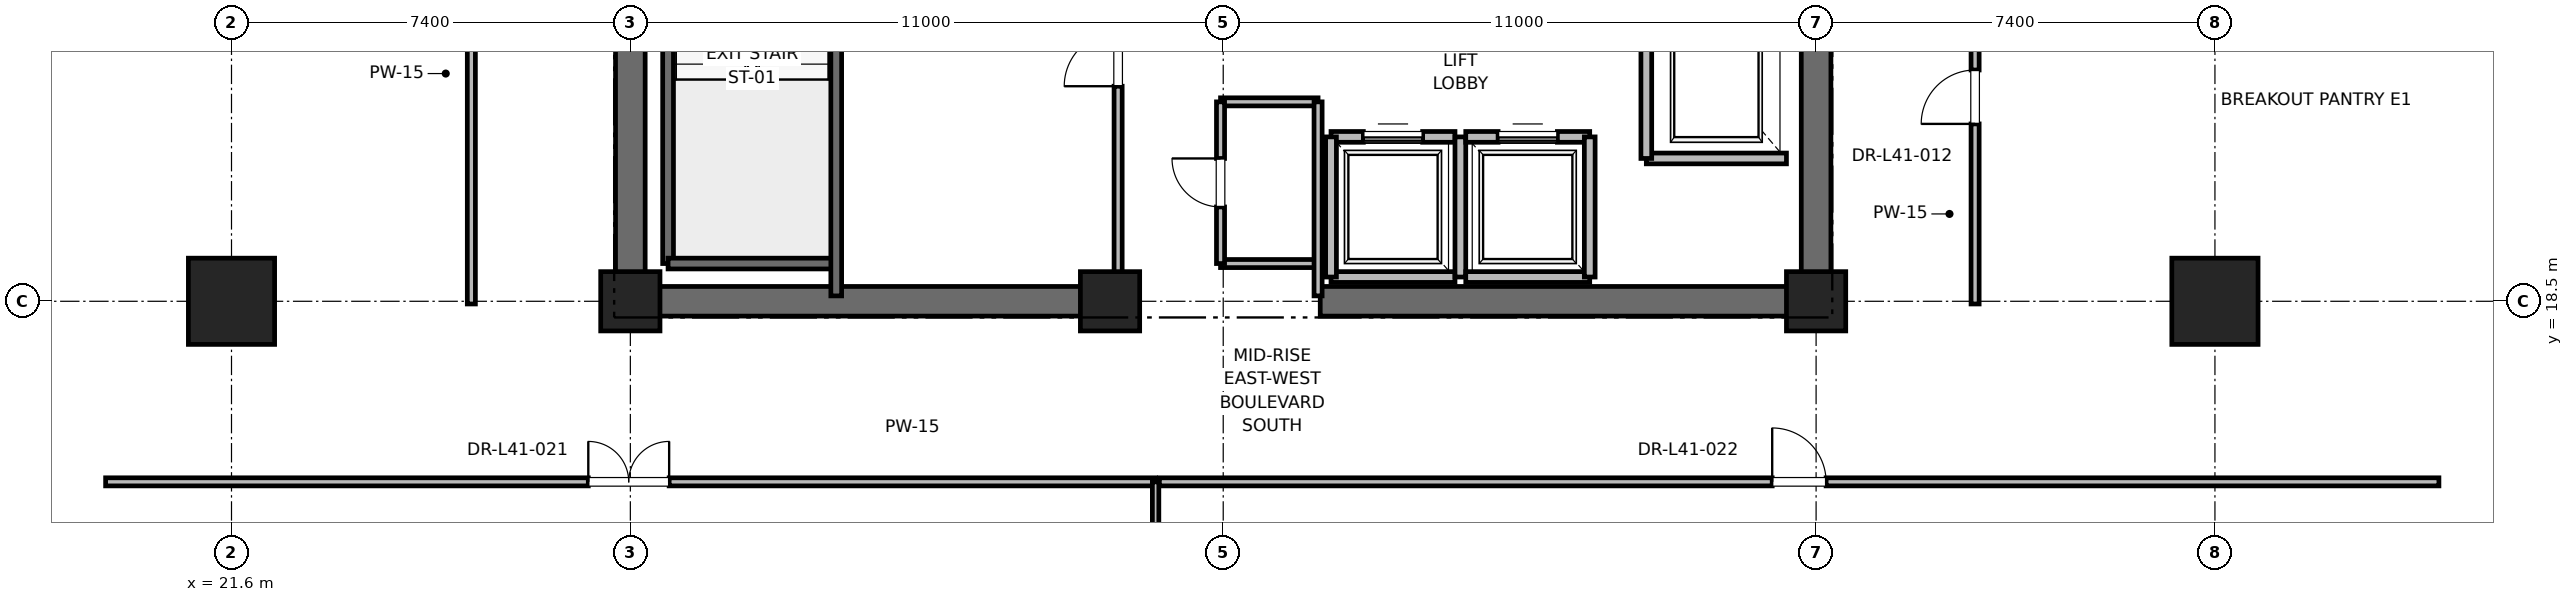
"""IFC4 building model, lengths in metres.
Left out: names, types, materials, properties, quantities, classifications, styles, units other than length and angle.
Written with IfcOpenShell. Run it as: python <this file> out.ifc"""

import sys

from ifc_helpers import new_model, si_unit, direction, frame, frame_2d, origin, origin_2d, place, context, subcontext, project, spatial, rectangle, extrude, element, fill, save


model = new_model("IFC4")
c1 = context("Model", 3, precision=1e-05, world=origin(), true_north=direction((0.0, 1.0)))
c2 = subcontext(c1, "Body", "Model", "MODEL_VIEW")
j1 = project(units=[si_unit("LENGTHUNIT", "METRE"), si_unit("PLANEANGLEUNIT", "RADIAN")], contexts=[c1])
p1 = place(None, origin())
s1 = spatial("IfcSite", under=j1, at=p1, CompositionType="ELEMENT")
p2 = place(p1, origin())
s2 = spatial("IfcBuilding", under=s1, at=p2, CompositionType="ELEMENT")
p3 = place(p2, frame((0.0, 0.0, 176.4)))
s3 = spatial("IfcBuildingStorey", under=s2, at=p3, CompositionType="ELEMENT", Elevation=176.4)
for number, where, z_axis, x_axis in (
    (1, (21.6, 18.5, 0.0), (0.0, 0.0, 1.0), (1.0, 0.0, 0.0)),
    (2, (58.4, 18.5, 0.0), (0.0, 0.0, 1.0), (1.0, 0.0, 0.0)),
):
    element("IfcColumn", number, at=place(p3, frame(where, z_axis=z_axis, x_axis=x_axis)), inside=s3, PredefinedType="COLUMN", context=c2, shape_type="SweptSolid", body=[
        extrude(rectangle(XDim=1.6, YDim=1.6, at=origin_2d()), origin(), (0.0, 0.0, 1.0), 4.0),
    ])
for number, where, z_axis, x_axis in (
    (3, (29.0, 18.5, 0.0), (0.0, 0.0, 1.0), (1.0, 0.0, 0.0)),
    (4, (51.0, 18.5, 0.0), (0.0, 0.0, 1.0), (1.0, 0.0, 0.0)),
    (5, (37.9, 18.5, 0.0), (0.0, 0.0, 1.0), (1.0, 0.0, 0.0)),
):
    element("IfcColumn", number, at=place(p3, frame(where, z_axis=z_axis, x_axis=x_axis)), inside=s3, PredefinedType="PILASTER", context=c2, shape_type="SweptSolid", body=[
        extrude(rectangle(XDim=1.1, YDim=1.1, at=origin_2d()), origin(), (0.0, 0.0, 1.0), 4.0),
    ])
for number, where, z_axis, x_axis in (
    (6, (29.0, 18.5, 0.0), (0.0, 0.0, 1.0), (1.0, 0.0, 0.0)),
    (7, (41.8, 18.5, 0.0), (0.0, 0.0, 1.0), (1.0, 0.0, 0.0)),
):
    element("IfcWall", number, at=place(p3, frame(where, z_axis=z_axis, x_axis=x_axis)), inside=s3, PredefinedType="SHEAR", context=c2, shape_type="SweptSolid", body=[
        extrude(rectangle(XDim=9.2, YDim=0.55, at=frame_2d((4.6, 0.0))), origin(), (0.0, 0.0, 1.0), 3.775),
    ])
p4 = place(p3, frame((29.0, 18.5, 0.0), z_axis=(0.0, 0.0, 1.0), x_axis=(0.0, 1.0, 0.0)))
e8 = element("IfcWall", 8, at=p4, inside=s3, PredefinedType="SHEAR", context=c2, shape_type="SweptSolid", body=[
    extrude(rectangle(XDim=8.8, YDim=0.55, at=frame_2d((4.4, 0.0))), origin(), (0.0, 0.0, 1.0), 3.775),
])
p5 = place(p3, frame((51.0, 18.5, 0.0), z_axis=(0.0, 0.0, 1.0), x_axis=(0.0, 1.0, 0.0)))
e9 = element("IfcWall", 9, at=p5, inside=s3, PredefinedType="SHEAR", context=c2, shape_type="SweptSolid", body=[
    extrude(rectangle(XDim=5.8, YDim=0.55, at=frame_2d((2.9, 0.0))), origin(), (0.0, 0.0, 1.0), 3.775),
])
p6 = place(p3, frame((29.7, 19.2, 0.0), z_axis=(0.0, 0.0, 1.0), x_axis=(0.0, 1.0, 0.0)))
e10 = element("IfcWall", 10, at=p6, inside=s3, PredefinedType="SOLIDWALL", context=c2, shape_type="SweptSolid", body=[
    extrude(rectangle(XDim=8.15, YDim=0.2, at=frame_2d((4.075, 0.0))), origin(), (0.0, 0.0, 1.0), 3.775),
])
p7 = place(p3, frame((29.7, 19.2, 0.0), z_axis=(0.0, 0.0, 1.0), x_axis=(1.0, 0.0, 0.0)))
e11 = element("IfcWall", 11, at=p7, inside=s3, PredefinedType="SOLIDWALL", context=c2, shape_type="SweptSolid", body=[
    extrude(rectangle(XDim=3.12, YDim=0.2, at=frame_2d((1.56, 0.0))), origin(), (0.0, 0.0, 1.0), 3.775),
])
p8 = place(p3, frame((32.82, 18.6, 0.0), z_axis=(0.0, 0.0, 1.0), x_axis=(0.0, 1.0, 0.0)))
e12 = element("IfcWall", 12, at=p8, inside=s3, PredefinedType="SOLIDWALL", context=c2, shape_type="SweptSolid", body=[
    extrude(rectangle(XDim=8.78, YDim=0.2, at=frame_2d((4.39, 0.0))), origin(), (0.0, 0.0, 1.0), 3.775),
])
p9 = place(p3, frame((47.85, 21.15, 0.0), z_axis=(0.0, 0.0, 1.0), x_axis=(1.0, 0.0, 0.0)))
e13 = element("IfcWall", 13, at=p9, inside=s3, PredefinedType="SOLIDWALL", context=c2, shape_type="SweptSolid", body=[
    extrude(rectangle(XDim=2.6, YDim=0.2, at=frame_2d((1.3, 0.0))), origin(), (0.0, 0.0, 1.0), 3.775),
])
p10 = place(p3, frame((47.85, 24.15, 0.0), z_axis=(0.0, 0.0, 1.0), x_axis=(0.0, -1.0, 0.0)))
e14 = element("IfcWall", 14, at=p10, inside=s3, PredefinedType="SOLIDWALL", context=c2, shape_type="SweptSolid", body=[
    extrude(rectangle(XDim=3.0, YDim=0.2, at=frame_2d((1.5, 0.0))), origin(), (0.0, 0.0, 1.0), 3.775),
])
p11 = place(p3, frame((42.0, 18.95, 0.0), z_axis=(0.0, 0.0, 1.0), x_axis=(1.0, 0.0, 0.0)))
e15 = element("IfcWall", 15, at=p11, inside=s3, PredefinedType="SOLIDWALL", context=c2, shape_type="SweptSolid", body=[
    extrude(rectangle(XDim=2.3, YDim=0.2, at=frame_2d((1.15, 0.0))), origin(), (0.0, 0.0, 1.0), 2.755),
])
p12 = place(p3, frame((44.3, 21.55, 0.0), z_axis=(0.0, 0.0, 1.0), x_axis=(-1.0, 0.0, 0.0)))
e16 = element("IfcWall", 16, at=p12, inside=s3, PredefinedType="SOLIDWALL", context=c2, shape_type="SweptSolid", body=[
    extrude(rectangle(XDim=2.3, YDim=0.2, at=frame_2d((1.15, 0.0))), origin(), (0.0, 0.0, 1.0), 3.775),
])
p13 = place(p12, frame((0.6, 0.0, 0.0)))
e17 = element("IfcOpeningElement", 17, at=p13, cuts=e16, PredefinedType="OPENING", context=c2, shape_type="SweptSolid", body=[
    extrude(rectangle(XDim=1.1, YDim=2.2, at=frame_2d((0.55, 1.1))), frame((0.0, 0.1, 0.0), z_axis=(0.0, -1.0, 0.0), x_axis=(1.0, 0.0, 0.0)), (0.0, 0.0, 1.0), 0.2),
])
p14 = place(p3, frame((42.0, 21.55, 0.0), z_axis=(0.0, 0.0, 1.0), x_axis=(0.0, -1.0, 0.0)))
e18 = element("IfcWall", 18, at=p14, inside=s3, PredefinedType="SOLIDWALL", context=c2, shape_type="SweptSolid", body=[
    extrude(rectangle(XDim=2.6, YDim=0.2, at=frame_2d((1.3, 0.0))), origin(), (0.0, 0.0, 1.0), 2.755),
])
p15 = place(p3, frame((44.4, 18.95, 0.0), z_axis=(0.0, 0.0, 1.0), x_axis=(0.0, 1.0, 0.0)))
e19 = element("IfcWall", 19, at=p15, inside=s3, PredefinedType="SOLIDWALL", context=c2, shape_type="SweptSolid", body=[
    extrude(rectangle(XDim=2.6, YDim=0.2, at=frame_2d((1.3, 0.0))), origin(), (0.0, 0.0, 1.0), 3.775),
])
p16 = place(p3, frame((44.5, 18.95, 0.0), z_axis=(0.0, 0.0, 1.0), x_axis=(1.0, 0.0, 0.0)))
e20 = element("IfcWall", 20, at=p16, inside=s3, PredefinedType="SOLIDWALL", context=c2, shape_type="SweptSolid", body=[
    extrude(rectangle(XDim=2.3, YDim=0.2, at=frame_2d((1.15, 0.0))), origin(), (0.0, 0.0, 1.0), 3.775),
])
p17 = place(p3, frame((46.8, 21.55, 0.0), z_axis=(0.0, 0.0, 1.0), x_axis=(-1.0, 0.0, 0.0)))
e21 = element("IfcWall", 21, at=p17, inside=s3, PredefinedType="SOLIDWALL", context=c2, shape_type="SweptSolid", body=[
    extrude(rectangle(XDim=2.3, YDim=0.2, at=frame_2d((1.15, 0.0))), origin(), (0.0, 0.0, 1.0), 3.775),
])
p18 = place(p17, frame((0.6, 0.0, 0.0)))
e22 = element("IfcOpeningElement", 22, at=p18, cuts=e21, PredefinedType="OPENING", context=c2, shape_type="SweptSolid", body=[
    extrude(rectangle(XDim=1.1, YDim=2.2, at=frame_2d((0.55, 1.1))), frame((0.0, 0.1, 0.0), z_axis=(0.0, -1.0, 0.0), x_axis=(1.0, 0.0, 0.0)), (0.0, 0.0, 1.0), 0.2),
])
p19 = place(p3, frame((46.8, 18.95, 0.0), z_axis=(0.0, 0.0, 1.0), x_axis=(0.0, 1.0, 0.0)))
e23 = element("IfcWall", 23, at=p19, inside=s3, PredefinedType="SOLIDWALL", context=c2, shape_type="SweptSolid", body=[
    extrude(rectangle(XDim=2.6, YDim=0.2, at=frame_2d((1.3, 0.0))), origin(), (0.0, 0.0, 1.0), 3.775),
])
for number, where, z_axis, x_axis in (
    (24, (39.95, 19.2, 0.0), (0.0, 0.0, 1.0), (1.0, 0.0, 0.0)),
    (25, (39.95, 22.2, 0.0), (0.0, 0.0, 1.0), (1.0, 0.0, 0.0)),
):
    element("IfcWall", number, at=place(p3, frame(where, z_axis=z_axis, x_axis=x_axis)), inside=s3, PredefinedType="PARTITIONING", context=c2, shape_type="SweptSolid", body=[
        extrude(rectangle(XDim=1.81, YDim=0.15, at=frame_2d((0.905, 0.0))), origin(), (0.0, 0.0, 1.0), 2.85),
    ])
p20 = place(p3, frame((41.76, 18.6, 0.0), z_axis=(0.0, 0.0, 1.0), x_axis=(0.0, 1.0, 0.0)))
e26 = element("IfcWall", 26, at=p20, inside=s3, PredefinedType="PARTITIONING", context=c2, shape_type="SweptSolid", body=[
    extrude(rectangle(XDim=3.6, YDim=0.15, at=frame_2d((1.8, 0.0))), origin(), (0.0, 0.0, 1.0), 2.755),
])
p21 = place(p3, frame((39.95, 19.2, 0.0), z_axis=(0.0, 0.0, 1.0), x_axis=(0.0, 1.0, 0.0)))
e27 = element("IfcWall", 27, at=p21, inside=s3, PredefinedType="PARTITIONING", context=c2, shape_type="SweptSolid", body=[
    extrude(rectangle(XDim=3.0, YDim=0.15, at=frame_2d((1.5, 0.0))), origin(), (0.0, 0.0, 1.0), 2.85),
])
p22 = place(p21, frame((1.05, 0.0, 0.0)))
e28 = element("IfcOpeningElement", 28, at=p22, cuts=e27, PredefinedType="OPENING", context=c2, shape_type="SweptSolid", body=[
    extrude(rectangle(XDim=0.9, YDim=2.1, at=frame_2d((0.45, 1.05))), frame((0.0, 0.075, 0.0), z_axis=(0.0, -1.0, 0.0), x_axis=(1.0, 0.0, 0.0)), (0.0, 0.0, 1.0), 0.15),
])
p23 = place(p3, frame((38.05, 18.6, 0.0), z_axis=(0.0, 0.0, 1.0), x_axis=(0.0, 1.0, 0.0)))
e29 = element("IfcWall", 29, at=p23, inside=s3, PredefinedType="PARTITIONING", context=c2, shape_type="SweptSolid", body=[
    extrude(rectangle(XDim=8.78, YDim=0.15, at=frame_2d((4.39, 0.0))), origin(), (0.0, 0.0, 1.0), 2.755),
])
p24 = place(p23, frame((3.89, 0.0, 0.0)))
e30 = element("IfcOpeningElement", 30, at=p24, cuts=e29, PredefinedType="OPENING", context=c2, shape_type="SweptSolid", body=[
    extrude(rectangle(XDim=1.0, YDim=2.15, at=frame_2d((0.5, 1.075))), frame((0.0, 0.075, 0.0), z_axis=(0.0, -1.0, 0.0), x_axis=(1.0, 0.0, 0.0)), (0.0, 0.0, 1.0), 0.15),
])
p25 = place(p3, frame((19.264, 15.15, 0.0), z_axis=(0.0, 0.0, 1.0), x_axis=(1.0, 0.0, 0.0)))
e31 = element("IfcWall", 31, at=p25, inside=s3, PredefinedType="PARTITIONING", context=c2, shape_type="SweptSolid", body=[
    extrude(rectangle(XDim=19.481, YDim=0.15, at=frame_2d((9.74, 0.0))), origin(), (0.0, 0.0, 1.0), 2.85),
])
p26 = place(p25, frame((8.956, 0.0, 0.0)))
e32 = element("IfcOpeningElement", 32, at=p26, cuts=e31, PredefinedType="OPENING", context=c2, shape_type="SweptSolid", body=[
    extrude(rectangle(XDim=1.5, YDim=2.25, at=frame_2d((0.75, 1.125))), frame((0.0, 0.075, 0.0), z_axis=(0.0, -1.0, 0.0), x_axis=(1.0, 0.0, 0.0)), (0.0, 0.0, 1.0), 0.15),
])
p27 = place(p3, frame((38.745, 5.905, 0.0), z_axis=(0.0, 0.0, 1.0), x_axis=(0.0, 1.0, 0.0)))
e33 = element("IfcWall", 33, at=p27, inside=s3, PredefinedType="PARTITIONING", context=c2, shape_type="SweptSolid", body=[
    extrude(rectangle(XDim=9.245, YDim=0.12, at=frame_2d((4.623, 0.0))), origin(), (0.0, 0.0, 1.0), 2.405),
])
p28 = place(p3, frame((38.815, 15.15, 0.0), z_axis=(0.0, 0.0, 1.0), x_axis=(1.0, 0.0, 0.0)))
e34 = element("IfcWall", 34, at=p28, inside=s3, PredefinedType="PARTITIONING", context=c2, shape_type="SweptSolid", body=[
    extrude(rectangle(XDim=23.74, YDim=0.15, at=frame_2d((11.87, 0.0))), origin(), (0.0, 0.0, 1.0), 2.85),
])
p29 = place(p28, frame((11.37, 0.0, 0.0)))
e35 = element("IfcOpeningElement", 35, at=p29, cuts=e34, PredefinedType="OPENING", context=c2, shape_type="SweptSolid", body=[
    extrude(rectangle(XDim=1.0, YDim=2.15, at=frame_2d((0.5, 1.075))), frame((0.0, 0.075, 0.0), z_axis=(0.0, -1.0, 0.0), x_axis=(1.0, 0.0, 0.0)), (0.0, 0.0, 1.0), 0.15),
])
p30 = place(p3, frame((26.05, 18.45, 0.0), z_axis=(0.0, 0.0, 1.0), x_axis=(0.0, 1.0, 0.0)))
e36 = element("IfcWall", 36, at=p30, inside=s3, PredefinedType="PARTITIONING", context=c2, shape_type="SweptSolid", body=[
    extrude(rectangle(XDim=18.1, YDim=0.15, at=frame_2d((9.05, 0.0))), origin(), (0.0, 0.0, 1.0), 2.85),
])
p31 = place(p30, frame((8.55, 0.0, 0.0)))
e37 = element("IfcOpeningElement", 37, at=p31, cuts=e36, PredefinedType="OPENING", context=c2, shape_type="SweptSolid", body=[
    extrude(rectangle(XDim=1.0, YDim=2.15, at=frame_2d((0.5, 1.075))), frame((0.0, 0.075, 0.0), z_axis=(0.0, -1.0, 0.0), x_axis=(1.0, 0.0, 0.0)), (0.0, 0.0, 1.0), 0.15),
])
p32 = place(p3, frame((53.95, 18.45, 0.0), z_axis=(0.0, 0.0, 1.0), x_axis=(0.0, 1.0, 0.0)))
e38 = element("IfcWall", 38, at=p32, inside=s3, PredefinedType="PARTITIONING", context=c2, shape_type="SweptSolid", body=[
    extrude(rectangle(XDim=7.602, YDim=0.15, at=frame_2d((3.801, 0.0))), origin(), (0.0, 0.0, 1.0), 2.85),
])
p33 = place(p32, frame((3.341, 0.0, 0.0)))
e39 = element("IfcOpeningElement", 39, at=p33, cuts=e38, PredefinedType="OPENING", context=c2, shape_type="SweptSolid", body=[
    extrude(rectangle(XDim=1.0, YDim=2.15, at=frame_2d((0.5, 1.075))), frame((0.0, 0.075, 0.0), z_axis=(0.0, -1.0, 0.0), x_axis=(1.0, 0.0, 0.0)), (0.0, 0.0, 1.0), 0.15),
])
p34 = place(p13, origin())
e40 = element("IfcDoor", 40, at=p34, inside=s3, OperationType="SLIDING_TO_RIGHT", PredefinedType="DOOR", context=c2, shape_type="SweptSolid", body=[
    extrude(rectangle(XDim=1.1, YDim=2.2, at=frame_2d((0.55, 1.1))), frame((0.0, 0.025, 0.0), z_axis=(0.0, -1.0, 0.0), x_axis=(1.0, 0.0, 0.0)), (0.0, 0.0, 1.0), 0.05),
])
fill(e17, e40)
p35 = place(p18, origin())
e41 = element("IfcDoor", 41, at=p35, inside=s3, OperationType="SLIDING_TO_RIGHT", PredefinedType="DOOR", context=c2, shape_type="SweptSolid", body=[
    extrude(rectangle(XDim=1.1, YDim=2.2, at=frame_2d((0.55, 1.1))), frame((0.0, 0.025, 0.0), z_axis=(0.0, -1.0, 0.0), x_axis=(1.0, 0.0, 0.0)), (0.0, 0.0, 1.0), 0.05),
])
fill(e22, e41)
p36 = place(p22, origin())
e42 = element("IfcDoor", 42, at=p36, inside=s3, OperationType="SINGLE_SWING_RIGHT", PredefinedType="DOOR", context=c2, shape_type="SweptSolid", body=[
    extrude(rectangle(XDim=0.9, YDim=2.1, at=frame_2d((0.45, 1.05))), frame((0.0, 0.025, 0.0), z_axis=(0.0, -1.0, 0.0), x_axis=(1.0, 0.0, 0.0)), (0.0, 0.0, 1.0), 0.05),
])
fill(e28, e42)
p37 = place(p24, origin())
e43 = element("IfcDoor", 43, at=p37, inside=s3, OperationType="SINGLE_SWING_LEFT", PredefinedType="DOOR", context=c2, shape_type="SweptSolid", body=[
    extrude(rectangle(XDim=1.0, YDim=2.15, at=frame_2d((0.5, 1.075))), frame((0.0, 0.025, 0.0), z_axis=(0.0, -1.0, 0.0), x_axis=(1.0, 0.0, 0.0)), (0.0, 0.0, 1.0), 0.05),
])
fill(e30, e43)
p38 = place(p26, origin())
e44 = element("IfcDoor", 44, at=p38, inside=s3, OperationType="DOUBLE_DOOR_SINGLE_SWING", PredefinedType="DOOR", context=c2, shape_type="SweptSolid", body=[
    extrude(rectangle(XDim=1.5, YDim=2.25, at=frame_2d((0.75, 1.125))), frame((0.0, 0.025, 0.0), z_axis=(0.0, -1.0, 0.0), x_axis=(1.0, 0.0, 0.0)), (0.0, 0.0, 1.0), 0.05),
])
fill(e32, e44)
p39 = place(p29, origin())
e45 = element("IfcDoor", 45, at=p39, inside=s3, OperationType="SINGLE_SWING_LEFT", PredefinedType="DOOR", context=c2, shape_type="SweptSolid", body=[
    extrude(rectangle(XDim=1.0, YDim=2.15, at=frame_2d((0.5, 1.075))), frame((0.0, 0.025, 0.0), z_axis=(0.0, -1.0, 0.0), x_axis=(1.0, 0.0, 0.0)), (0.0, 0.0, 1.0), 0.05),
])
fill(e35, e45)
p40 = place(p33, origin())
e46 = element("IfcDoor", 46, at=p40, inside=s3, OperationType="SINGLE_SWING_LEFT", PredefinedType="DOOR", context=c2, shape_type="SweptSolid", body=[
    extrude(rectangle(XDim=1.0, YDim=2.15, at=frame_2d((0.5, 1.075))), frame((0.0, 0.025, 0.0), z_axis=(0.0, -1.0, 0.0), x_axis=(1.0, 0.0, 0.0)), (0.0, 0.0, 1.0), 0.05),
])
fill(e39, e46)
save(model, sys.argv[1])
